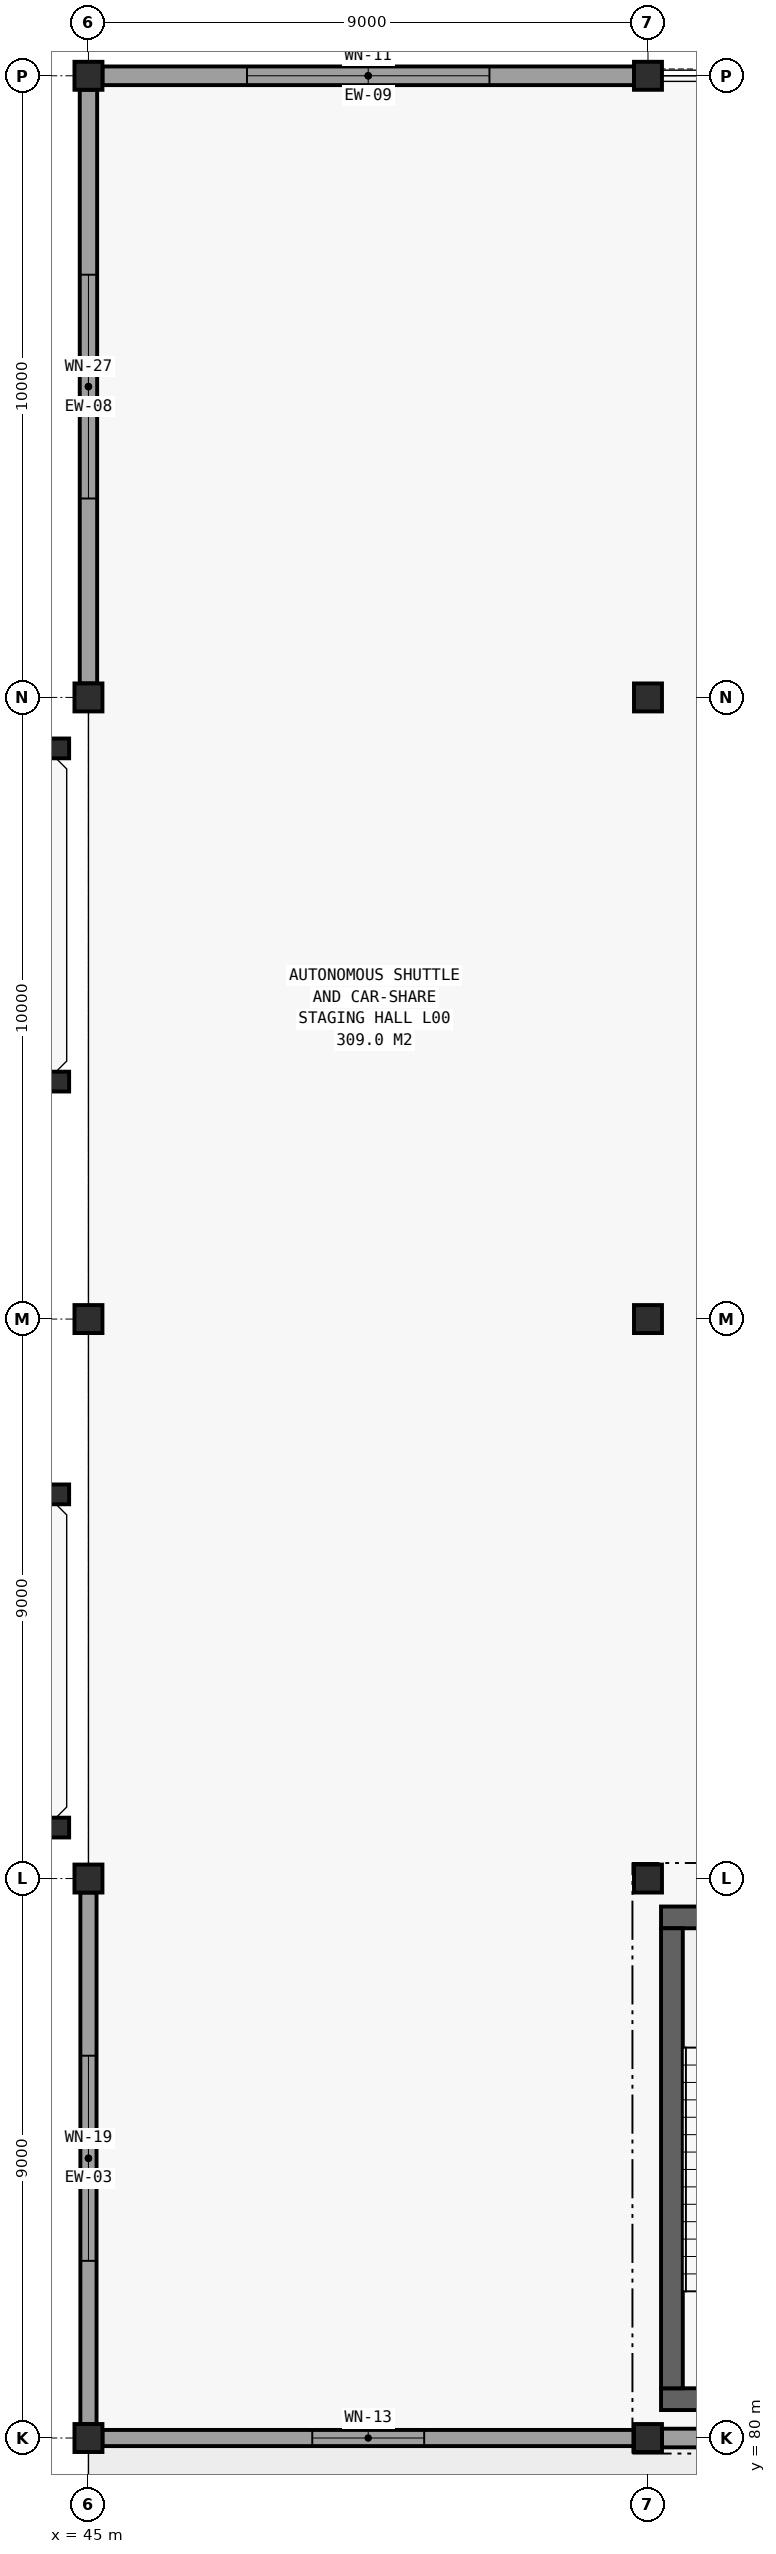
"""IFC4 building model, lengths in metres.
Left out: names, types, materials, properties, quantities, classifications, styles, units other than length and angle.
Written with IfcOpenShell. Run it as: python <this file> out.ifc"""

import sys

from ifc_helpers import new_model, si_unit, direction, frame, frame_2d, origin, origin_2d, place, context, subcontext, project, spatial, rectangle, hollow_rectangle, hollow_circle, extrude, element, fill, save


model = new_model("IFC4")
c1 = context("Model", 3, precision=1e-05, world=origin(), true_north=direction((0.0, 1.0)))
c2 = subcontext(c1, "Body", "Model", "MODEL_VIEW")
j1 = project(units=[si_unit("LENGTHUNIT", "METRE"), si_unit("PLANEANGLEUNIT", "RADIAN")], contexts=[c1])
p1 = place(None, origin())
s1 = spatial("IfcSite", under=j1, at=p1, CompositionType="ELEMENT")
p2 = place(p1, origin())
s2 = spatial("IfcBuilding", under=s1, at=p2, CompositionType="ELEMENT")
p3 = place(p2, origin())
s3 = spatial("IfcBuildingStorey", under=s2, at=p3, CompositionType="ELEMENT", Elevation=0.0)
for number, where, z_axis, x_axis in (
    (1, (44.53, 89.82, 0.0), (0.0, 0.0, 1.0), (1.0, 0.0, 0.0)),
    (2, (44.53, 95.18, 0.0), (0.0, 0.0, 1.0), (1.0, 0.0, 0.0)),
    (3, (44.53, 101.82, 0.0), (0.0, 0.0, 1.0), (1.0, 0.0, 0.0)),
    (4, (44.53, 107.18, 0.0), (0.0, 0.0, 1.0), (1.0, 0.0, 0.0)),
):
    element("IfcColumn", number, at=place(p3, frame(where, z_axis=z_axis, x_axis=x_axis)), inside=s3, PredefinedType="COLUMN", context=c2, shape_type="SweptSolid", body=[
        extrude(hollow_circle(Radius=0.159, WallThickness=0.01, at=origin_2d()), origin(), (0.0, 0.0, 1.0), 5.1),
    ])
for number, where, z_axis, x_axis in (
    (5, (45.0, 80.0, 0.0), (0.0, 0.0, 1.0), (1.0, 0.0, 0.0)),
    (6, (45.0, 89.0, 0.0), (0.0, 0.0, 1.0), (1.0, 0.0, 0.0)),
    (7, (45.0, 98.0, 0.0), (0.0, 0.0, 1.0), (1.0, 0.0, 0.0)),
    (8, (45.0, 108.0, 0.0), (0.0, 0.0, 1.0), (1.0, 0.0, 0.0)),
    (9, (45.0, 118.0, 0.0), (0.0, 0.0, 1.0), (1.0, 0.0, 0.0)),
    (10, (54.0, 80.0, 0.0), (0.0, 0.0, 1.0), (1.0, 0.0, 0.0)),
    (11, (54.0, 89.0, 0.0), (0.0, 0.0, 1.0), (1.0, 0.0, 0.0)),
    (12, (54.0, 98.0, 0.0), (0.0, 0.0, 1.0), (1.0, 0.0, 0.0)),
    (13, (54.0, 108.0, 0.0), (0.0, 0.0, 1.0), (1.0, 0.0, 0.0)),
    (14, (54.0, 118.0, 0.0), (0.0, 0.0, 1.0), (1.0, 0.0, 0.0)),
):
    element("IfcColumn", number, at=place(p3, frame(where, z_axis=z_axis, x_axis=x_axis)), inside=s3, PredefinedType="COLUMN", context=c2, shape_type="SweptSolid", body=[
        extrude(hollow_rectangle(XDim=0.45, YDim=0.45, WallThickness=0.022, at=origin_2d()), origin(), (0.0, 0.0, 1.0), 5.1),
    ])
p4 = place(p3, frame((45.225, 80.0, 0.0), z_axis=(0.0, 0.0, 1.0), x_axis=(1.0, 0.0, 0.0)))
e15 = element("IfcWall", 15, at=p4, inside=s3, PredefinedType="SOLIDWALL", context=c2, shape_type="SweptSolid", body=[
    extrude(rectangle(XDim=8.55, YDim=0.26, at=frame_2d((4.275, 0.0))), origin(), (0.0, 0.0, 1.0), 4.19),
])
p5 = place(p4, frame((3.375, 0.0, 0.95)))
e16 = element("IfcOpeningElement", 16, at=p5, cuts=e15, PredefinedType="OPENING", context=c2, shape_type="SweptSolid", body=[
    extrude(rectangle(XDim=1.8, YDim=2.2, at=frame_2d((0.9, 1.1))), frame((0.0, 0.141, 0.0), z_axis=(0.0, -1.0, 0.0), x_axis=(1.0, 0.0, 0.0)), (0.0, 0.0, 1.0), 0.282),
])
p6 = place(p3, frame((54.225, 80.0, 0.0), z_axis=(0.0, 0.0, 1.0), x_axis=(1.0, 0.0, 0.0)))
e17 = element("IfcWall", 17, at=p6, inside=s3, PredefinedType="SOLIDWALL", context=c2, shape_type="SweptSolid", body=[
    extrude(rectangle(XDim=8.55, YDim=0.3, at=frame_2d((4.275, 0.0))), origin(), (0.0, 0.0, 1.0), 4.19),
])
p7 = place(p6, frame((7.075, 0.0, 0.0), z_axis=(0.0, 0.0, 1.0), x_axis=(-1.0, 0.0, 0.0)))
e18 = element("IfcOpeningElement", 18, at=p7, cuts=e17, PredefinedType="OPENING", context=c2, shape_type="SweptSolid", body=[
    extrude(rectangle(XDim=1.9, YDim=2.4, at=frame_2d((0.95, 1.2))), frame((0.0, 0.161, 0.0), z_axis=(0.0, -1.0, 0.0), x_axis=(1.0, 0.0, 0.0)), (0.0, 0.0, 1.0), 0.322),
])
p8 = place(p3, frame((53.775, 118.0, 0.0), z_axis=(0.0, 0.0, 1.0), x_axis=(-1.0, 0.0, 0.0)))
e19 = element("IfcWall", 19, at=p8, inside=s3, PredefinedType="SOLIDWALL", context=c2, shape_type="SweptSolid", body=[
    extrude(rectangle(XDim=8.55, YDim=0.3, at=frame_2d((4.275, 0.0))), origin(), (0.0, 0.0, 1.0), 4.19),
])
p9 = place(p8, frame((2.325, 0.0, 0.95)))
e20 = element("IfcOpeningElement", 20, at=p9, cuts=e19, PredefinedType="OPENING", context=c2, shape_type="SweptSolid", body=[
    extrude(rectangle(XDim=3.9, YDim=1.5, at=frame_2d((1.95, 0.75))), frame((0.0, 0.161, 0.0), z_axis=(0.0, -1.0, 0.0), x_axis=(1.0, 0.0, 0.0)), (0.0, 0.0, 1.0), 0.322),
])
p10 = place(p3, frame((45.0, 117.775, 0.0), z_axis=(0.0, 0.0, 1.0), x_axis=(0.0, -1.0, 0.0)))
e21 = element("IfcWall", 21, at=p10, inside=s3, PredefinedType="SOLIDWALL", context=c2, shape_type="SweptSolid", body=[
    extrude(rectangle(XDim=9.55, YDim=0.28, at=frame_2d((4.775, 0.0))), origin(), (0.0, 0.0, 1.0), 4.09),
])
p11 = place(p10, frame((2.975, 0.0, 0.95)))
e22 = element("IfcOpeningElement", 22, at=p11, cuts=e21, PredefinedType="OPENING", context=c2, shape_type="SweptSolid", body=[
    extrude(rectangle(XDim=3.6, YDim=1.5, at=frame_2d((1.8, 0.75))), frame((0.0, 0.151, 0.0), z_axis=(0.0, -1.0, 0.0), x_axis=(1.0, 0.0, 0.0)), (0.0, 0.0, 1.0), 0.302),
])
p12 = place(p3, frame((45.0, 88.775, 0.0), z_axis=(0.0, 0.0, 1.0), x_axis=(0.0, -1.0, 0.0)))
e23 = element("IfcWall", 23, at=p12, inside=s3, PredefinedType="SOLIDWALL", context=c2, shape_type="SweptSolid", body=[
    extrude(rectangle(XDim=8.55, YDim=0.26, at=frame_2d((4.275, 0.0))), origin(), (0.0, 0.0, 1.0), 4.09),
])
p13 = place(p12, frame((2.625, 0.0, 0.95)))
e24 = element("IfcOpeningElement", 24, at=p13, cuts=e23, PredefinedType="OPENING", context=c2, shape_type="SweptSolid", body=[
    extrude(rectangle(XDim=3.3, YDim=1.4, at=frame_2d((1.65, 0.7))), frame((0.0, 0.141, 0.0), z_axis=(0.0, -1.0, 0.0), x_axis=(1.0, 0.0, 0.0)), (0.0, 0.0, 1.0), 0.282),
])
for number, where, z_axis, x_axis in (
    (25, (54.21, 80.625, 0.0), (0.0, 0.0, 1.0), (1.0, 0.0, 0.0)),
    (26, (54.21, 88.375, 0.0), (0.0, 0.0, 1.0), (1.0, 0.0, 0.0)),
):
    element("IfcWall", number, at=place(p3, frame(where, z_axis=z_axis, x_axis=x_axis)), inside=s3, PredefinedType="SHEAR", context=c2, shape_type="SweptSolid", body=[
        extrude(rectangle(XDim=3.98, YDim=0.35, at=frame_2d((1.99, 0.0))), origin(), (0.0, 0.0, 1.0), 4.84),
    ])
p14 = place(p3, frame((54.385, 80.8, 0.0), z_axis=(0.0, 0.0, 1.0), x_axis=(0.0, 1.0, 0.0)))
e27 = element("IfcWall", 27, at=p14, inside=s3, PredefinedType="SHEAR", context=c2, shape_type="SweptSolid", body=[
    extrude(rectangle(XDim=7.4, YDim=0.35, at=frame_2d((3.7, 0.0))), origin(), (0.0, 0.0, 1.0), 4.84),
])
p15 = place(p5, origin())
e28 = element("IfcWindow", 28, at=p15, inside=s3, PartitioningType="SINGLE_PANEL", PredefinedType="WINDOW", context=c2, shape_type="SweptSolid", body=[
    extrude(rectangle(XDim=1.8, YDim=2.2, at=frame_2d((0.9, 1.1))), frame((0.0, 0.03, 0.0), z_axis=(0.0, -1.0, 0.0), x_axis=(1.0, 0.0, 0.0)), (0.0, 0.0, 1.0), 0.06),
])
fill(e16, e28)
p16 = place(p9, origin())
e29 = element("IfcWindow", 29, at=p16, inside=s3, PartitioningType="SINGLE_PANEL", PredefinedType="WINDOW", context=c2, shape_type="SweptSolid", body=[
    extrude(rectangle(XDim=3.9, YDim=1.5, at=frame_2d((1.95, 0.75))), frame((0.0, 0.03, 0.0), z_axis=(0.0, -1.0, 0.0), x_axis=(1.0, 0.0, 0.0)), (0.0, 0.0, 1.0), 0.06),
])
fill(e20, e29)
p17 = place(p11, origin())
e30 = element("IfcWindow", 30, at=p17, inside=s3, PartitioningType="SINGLE_PANEL", PredefinedType="WINDOW", context=c2, shape_type="SweptSolid", body=[
    extrude(rectangle(XDim=3.6, YDim=1.5, at=frame_2d((1.8, 0.75))), frame((0.0, 0.03, 0.0), z_axis=(0.0, -1.0, 0.0), x_axis=(1.0, 0.0, 0.0)), (0.0, 0.0, 1.0), 0.06),
])
fill(e22, e30)
p18 = place(p13, origin())
e31 = element("IfcWindow", 31, at=p18, inside=s3, PartitioningType="SINGLE_PANEL", PredefinedType="WINDOW", context=c2, shape_type="SweptSolid", body=[
    extrude(rectangle(XDim=3.3, YDim=1.4, at=frame_2d((1.65, 0.7))), frame((0.0, 0.03, 0.0), z_axis=(0.0, -1.0, 0.0), x_axis=(1.0, 0.0, 0.0)), (0.0, 0.0, 1.0), 0.06),
])
fill(e24, e31)
save(model, sys.argv[1])
